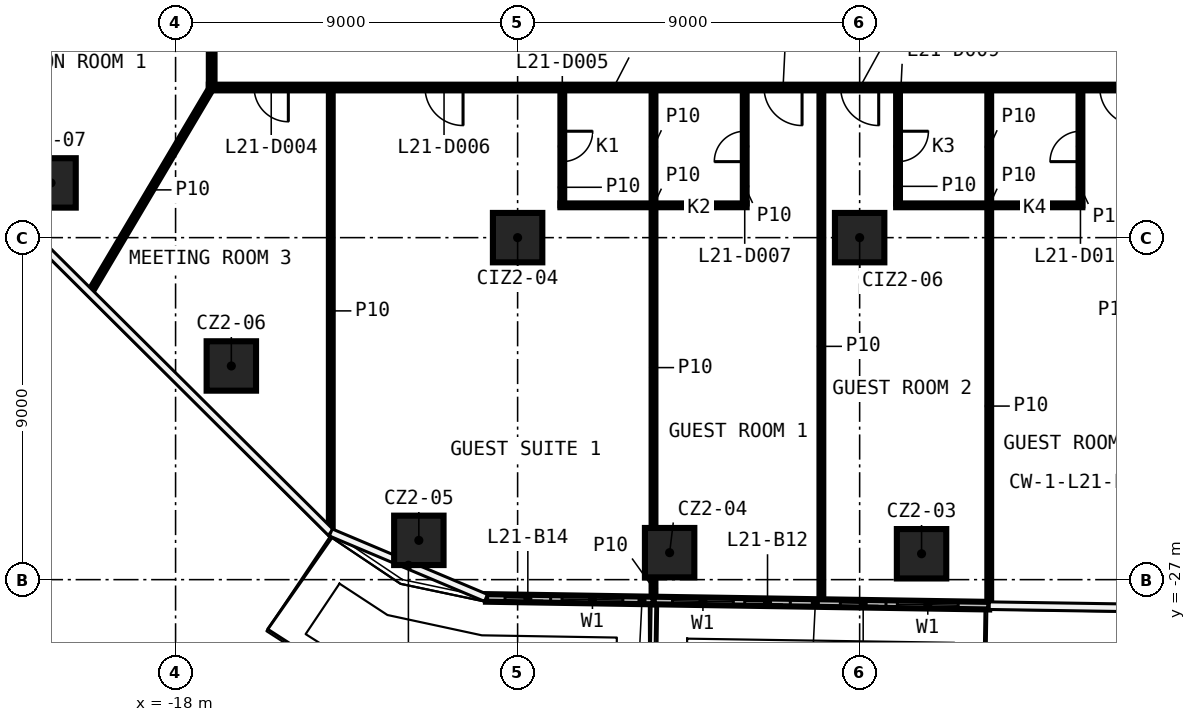
"""IFC4 building model, lengths in metres.
Left out: names, types, materials, properties, quantities, classifications, styles, units other than length and angle.
Written with IfcOpenShell. Run it as: python <this file> out.ifc"""

import sys

from ifc_helpers import new_model, si_unit, direction, frame, frame_2d, origin, origin_2d, place, context, subcontext, project, spatial, rectangle, extrude, element, fill, save


model = new_model("IFC4")
c1 = context("Model", 3, precision=1e-05, world=origin(), true_north=direction((0.0, 1.0)))
c2 = subcontext(c1, "Body", "Model", "MODEL_VIEW")
j1 = project(units=[si_unit("LENGTHUNIT", "METRE"), si_unit("PLANEANGLEUNIT", "RADIAN")], contexts=[c1])
p1 = place(None, origin())
s1 = spatial("IfcSite", under=j1, at=p1, CompositionType="ELEMENT")
p2 = place(p1, origin())
s2 = spatial("IfcBuilding", under=s1, at=p2, CompositionType="ELEMENT")
p3 = place(p2, frame((0.0, 0.0, 102.6)))
s3 = spatial("IfcBuildingStorey", under=s2, at=p3, CompositionType="ELEMENT", Elevation=102.6)
for number, where, z_axis, x_axis in (
    (1, (1.629, -26.319, 0.0), (0.0, 0.0, 1.0), (1.0, 0.0, 0.0)),
    (2, (-5.0, -26.29, 0.0), (0.0, 0.0, 1.0), (1.0, 0.0, 0.0)),
    (3, (-11.599, -25.966, 0.0), (0.0, 0.0, 1.0), (1.0, 0.0, 0.0)),
    (4, (-16.533, -21.377, 0.0), (0.0, 0.0, 1.0), (1.0, 0.0, 0.0)),
    (5, (-21.277, -16.56, 0.0), (0.0, 0.0, 1.0), (1.0, 0.0, 0.0)),
    (6, (-9.0, -18.0, 0.0), (0.0, 0.0, 1.0), (1.0, 0.0, 0.0)),
    (7, (0.0, -18.0, 0.0), (0.0, 0.0, 1.0), (1.0, 0.0, 0.0)),
):
    element("IfcColumn", number, at=place(p3, frame(where, z_axis=z_axis, x_axis=x_axis)), inside=s3, PredefinedType="COLUMN", context=c2, shape_type="SweptSolid", body=[
        extrude(rectangle(XDim=1.3, YDim=1.3, at=origin_2d()), origin(), (0.0, 0.0, 1.0), 3.3),
    ])
p4 = place(p3, frame((-7.874, -17.15, 0.0), z_axis=(0.0, 0.0, 1.0), x_axis=(1.0, 0.0, 0.0)))
e8 = element("IfcWall", 8, at=p4, inside=s3, PredefinedType="PARTITIONING", context=c2, shape_type="SweptSolid", body=[
    extrude(rectangle(XDim=4.9, YDim=0.1, at=frame_2d((2.45, 0.0))), origin(), (0.0, 0.0, 1.0), 3.3),
])
p5 = place(p3, frame((0.96, -17.15, 0.0), z_axis=(0.0, 0.0, 1.0), x_axis=(1.0, 0.0, 0.0)))
e9 = element("IfcWall", 9, at=p5, inside=s3, PredefinedType="PARTITIONING", context=c2, shape_type="SweptSolid", body=[
    extrude(rectangle(XDim=4.9, YDim=0.1, at=frame_2d((2.45, 0.0))), origin(), (0.0, 0.0, 1.0), 3.3),
])
p6 = place(p3, frame((17.125, -14.05, 0.0), z_axis=(0.0, 0.0, 1.0), x_axis=(-1.0, 0.0, 0.0)))
e10 = element("IfcWall", 10, at=p6, inside=s3, PredefinedType="PARTITIONING", context=c2, shape_type="SweptSolid", body=[
    extrude(rectangle(XDim=34.25, YDim=0.15, at=frame_2d((17.125, 0.0))), origin(), (0.0, 0.0, 1.0), 3.3),
])
p7 = place(p6, frame((32.158, 0.0, 0.0)))
e11 = element("IfcOpeningElement", 11, at=p7, cuts=e10, PredefinedType="OPENING", context=c2, shape_type="SweptSolid", body=[
    extrude(rectangle(XDim=0.9, YDim=2.1, at=frame_2d((0.45, 1.05))), frame((0.0, 0.085, 0.0), z_axis=(0.0, -1.0, 0.0), x_axis=(1.0, 0.0, 0.0)), (0.0, 0.0, 1.0), 0.17),
])
p8 = place(p6, frame((27.561, 0.0, 0.0)))
e12 = element("IfcOpeningElement", 12, at=p8, cuts=e10, PredefinedType="OPENING", context=c2, shape_type="SweptSolid", body=[
    extrude(rectangle(XDim=1.0, YDim=2.1, at=frame_2d((0.5, 1.05))), frame((0.0, 0.085, 0.0), z_axis=(0.0, -1.0, 0.0), x_axis=(1.0, 0.0, 0.0)), (0.0, 0.0, 1.0), 0.17),
])
p9 = place(p6, frame((18.64, 0.0, 0.0)))
e13 = element("IfcOpeningElement", 13, at=p9, cuts=e10, PredefinedType="OPENING", context=c2, shape_type="SweptSolid", body=[
    extrude(rectangle(XDim=1.0, YDim=2.1, at=frame_2d((0.5, 1.05))), frame((0.0, 0.085, 0.0), z_axis=(0.0, -1.0, 0.0), x_axis=(1.0, 0.0, 0.0)), (0.0, 0.0, 1.0), 0.17),
])
p10 = place(p6, frame((16.624, 0.0, 0.0)))
e14 = element("IfcOpeningElement", 14, at=p10, cuts=e10, PredefinedType="OPENING", context=c2, shape_type="SweptSolid", body=[
    extrude(rectangle(XDim=1.0, YDim=2.1, at=frame_2d((0.5, 1.05))), frame((0.0, 0.085, 0.0), z_axis=(0.0, -1.0, 0.0), x_axis=(1.0, 0.0, 0.0)), (0.0, 0.0, 1.0), 0.17),
])
p11 = place(p6, frame((9.807, 0.0, 0.0)))
e15 = element("IfcOpeningElement", 15, at=p11, cuts=e10, PredefinedType="OPENING", context=c2, shape_type="SweptSolid", body=[
    extrude(rectangle(XDim=1.0, YDim=2.1, at=frame_2d((0.5, 1.05))), frame((0.0, 0.085, 0.0), z_axis=(0.0, -1.0, 0.0), x_axis=(1.0, 0.0, 0.0)), (0.0, 0.0, 1.0), 0.17),
])
p12 = place(p6, frame((7.795, 0.0, 0.0)))
e16 = element("IfcOpeningElement", 16, at=p12, cuts=e10, PredefinedType="OPENING", context=c2, shape_type="SweptSolid", body=[
    extrude(rectangle(XDim=1.0, YDim=2.1, at=frame_2d((0.5, 1.05))), frame((0.0, 0.085, 0.0), z_axis=(0.0, -1.0, 0.0), x_axis=(1.0, 0.0, 0.0)), (0.0, 0.0, 1.0), 0.17),
])
p13 = place(p6, frame((1.119, 0.0, 0.0)))
e17 = element("IfcOpeningElement", 17, at=p13, cuts=e10, PredefinedType="OPENING", context=c2, shape_type="SweptSolid", body=[
    extrude(rectangle(XDim=1.0, YDim=2.1, at=frame_2d((0.5, 1.05))), frame((0.0, 0.085, 0.0), z_axis=(0.0, -1.0, 0.0), x_axis=(1.0, 0.0, 0.0)), (0.0, 0.0, 1.0), 0.17),
])
p14 = place(p3, frame((-20.246, -19.436, 0.0), z_axis=(0.0, 0.0, 1.0), x_axis=(0.510253226363, 0.86002421186, 0.0)))
e18 = element("IfcWall", 18, at=p14, inside=s3, PredefinedType="PARTITIONING", context=c2, shape_type="SweptSolid", body=[
    extrude(rectangle(XDim=6.263, YDim=0.1, at=frame_2d((3.132, 0.0))), origin(), (0.0, 0.0, 1.0), 3.3),
])
p15 = place(p3, frame((5.81, -17.15, 0.0), z_axis=(0.0, 0.0, 1.0), x_axis=(0.0, 1.0, 0.0)))
e19 = element("IfcWall", 19, at=p15, inside=s3, PredefinedType="PARTITIONING", context=c2, shape_type="SweptSolid", body=[
    extrude(rectangle(XDim=3.025, YDim=0.1, at=frame_2d((1.512, 0.0))), origin(), (0.0, 0.0, 1.0), 3.3),
])
p16 = place(p15, frame((1.15, 0.0, 0.0)))
e20 = element("IfcOpeningElement", 20, at=p16, cuts=e19, PredefinedType="OPENING", context=c2, shape_type="SweptSolid", body=[
    extrude(rectangle(XDim=0.8, YDim=2.1, at=frame_2d((0.4, 1.05))), frame((0.0, 0.06, 0.0), z_axis=(0.0, -1.0, 0.0), x_axis=(1.0, 0.0, 0.0)), (0.0, 0.0, 1.0), 0.12),
])
p17 = place(p3, frame((3.41, -27.665, 0.0), z_axis=(0.0, 0.0, 1.0), x_axis=(0.0, 1.0, 0.0)))
e21 = element("IfcWall", 21, at=p17, inside=s3, PredefinedType="PARTITIONING", context=c2, shape_type="SweptSolid", body=[
    extrude(rectangle(XDim=10.465, YDim=0.1, at=frame_2d((5.232, 0.0))), origin(), (0.0, 0.0, 1.0), 3.3),
])
p18 = place(p3, frame((3.41, -17.1, 0.0), z_axis=(0.0, 0.0, 1.0), x_axis=(0.0, 1.0, 0.0)))
e22 = element("IfcWall", 22, at=p18, inside=s3, PredefinedType="PARTITIONING", context=c2, shape_type="SweptSolid", body=[
    extrude(rectangle(XDim=2.975, YDim=0.1, at=frame_2d((1.488, 0.0))), origin(), (0.0, 0.0, 1.0), 3.3),
])
p19 = place(p3, frame((1.01, -14.125, 0.0), z_axis=(0.0, 0.0, 1.0), x_axis=(0.0, -1.0, 0.0)))
e23 = element("IfcWall", 23, at=p19, inside=s3, PredefinedType="PARTITIONING", context=c2, shape_type="SweptSolid", body=[
    extrude(rectangle(XDim=2.975, YDim=0.1, at=frame_2d((1.488, 0.0))), origin(), (0.0, 0.0, 1.0), 3.3),
])
p20 = place(p19, frame((1.075, 0.0, 0.0)))
e24 = element("IfcOpeningElement", 24, at=p20, cuts=e23, PredefinedType="OPENING", context=c2, shape_type="SweptSolid", body=[
    extrude(rectangle(XDim=0.8, YDim=2.1, at=frame_2d((0.4, 1.05))), frame((0.0, 0.06, 0.0), z_axis=(0.0, -1.0, 0.0), x_axis=(1.0, 0.0, 0.0)), (0.0, 0.0, 1.0), 0.12),
])
p21 = place(p3, frame((-1.007, -27.597, 0.0), z_axis=(0.0, 0.0, 1.0), x_axis=(0.0, 1.0, 0.0)))
e25 = element("IfcWall", 25, at=p21, inside=s3, PredefinedType="PARTITIONING", context=c2, shape_type="SweptSolid", body=[
    extrude(rectangle(XDim=13.472, YDim=0.1, at=frame_2d((6.736, 0.0))), origin(), (0.0, 0.0, 1.0), 3.3),
])
p22 = place(p3, frame((-3.024, -17.1, 0.0), z_axis=(0.0, 0.0, 1.0), x_axis=(0.0, 1.0, 0.0)))
e26 = element("IfcWall", 26, at=p22, inside=s3, PredefinedType="PARTITIONING", context=c2, shape_type="SweptSolid", body=[
    extrude(rectangle(XDim=2.975, YDim=0.1, at=frame_2d((1.488, 0.0))), origin(), (0.0, 0.0, 1.0), 3.3),
])
p23 = place(p22, frame((1.1, 0.0, 0.0)))
e27 = element("IfcOpeningElement", 27, at=p23, cuts=e26, PredefinedType="OPENING", context=c2, shape_type="SweptSolid", body=[
    extrude(rectangle(XDim=0.8, YDim=2.1, at=frame_2d((0.4, 1.05))), frame((0.0, 0.06, 0.0), z_axis=(0.0, -1.0, 0.0), x_axis=(1.0, 0.0, 0.0)), (0.0, 0.0, 1.0), 0.12),
])
p24 = place(p3, frame((-5.424, -27.529, 0.0), z_axis=(0.0, 0.0, 1.0), x_axis=(0.0, 1.0, 0.0)))
e28 = element("IfcWall", 28, at=p24, inside=s3, PredefinedType="PARTITIONING", context=c2, shape_type="SweptSolid", body=[
    extrude(rectangle(XDim=0.589, YDim=0.1, at=frame_2d((0.294, 0.0))), origin(), (0.0, 0.0, 1.0), 3.3),
])
p25 = place(p3, frame((-5.424, -25.64, 0.0), z_axis=(0.0, 0.0, 1.0), x_axis=(0.0, 1.0, 0.0)))
e29 = element("IfcWall", 29, at=p25, inside=s3, PredefinedType="PARTITIONING", context=c2, shape_type="SweptSolid", body=[
    extrude(rectangle(XDim=8.44, YDim=0.1, at=frame_2d((4.22, 0.0))), origin(), (0.0, 0.0, 1.0), 3.3),
])
p26 = place(p3, frame((-5.424, -17.1, 0.0), z_axis=(0.0, 0.0, 1.0), x_axis=(0.0, 1.0, 0.0)))
e30 = element("IfcWall", 30, at=p26, inside=s3, PredefinedType="PARTITIONING", context=c2, shape_type="SweptSolid", body=[
    extrude(rectangle(XDim=2.975, YDim=0.1, at=frame_2d((1.488, 0.0))), origin(), (0.0, 0.0, 1.0), 3.3),
])
p27 = place(p3, frame((-7.824, -14.125, 0.0), z_axis=(0.0, 0.0, 1.0), x_axis=(0.0, -1.0, 0.0)))
e31 = element("IfcWall", 31, at=p27, inside=s3, PredefinedType="PARTITIONING", context=c2, shape_type="SweptSolid", body=[
    extrude(rectangle(XDim=3.025, YDim=0.1, at=frame_2d((1.512, 0.0))), origin(), (0.0, 0.0, 1.0), 3.3),
])
p28 = place(p27, frame((1.075, 0.0, 0.0)))
e32 = element("IfcOpeningElement", 32, at=p28, cuts=e31, PredefinedType="OPENING", context=c2, shape_type="SweptSolid", body=[
    extrude(rectangle(XDim=0.8, YDim=2.1, at=frame_2d((0.4, 1.05))), frame((0.0, 0.06, 0.0), z_axis=(0.0, -1.0, 0.0), x_axis=(1.0, 0.0, 0.0)), (0.0, 0.0, 1.0), 0.12),
])
p29 = place(p3, frame((-13.916, -25.73, 0.0), z_axis=(0.0, 0.0, 1.0), x_axis=(0.0, 1.0, 0.0)))
e33 = element("IfcWall", 33, at=p29, inside=s3, PredefinedType="PARTITIONING", context=c2, shape_type="SweptSolid", body=[
    extrude(rectangle(XDim=11.605, YDim=0.1, at=frame_2d((5.802, 0.0))), origin(), (0.0, 0.0, 1.0), 3.3),
])
p30 = place(p3, frame((-17.05, -13.975, 0.0), z_axis=(0.0, 0.0, 1.0), x_axis=(0.0, 1.0, 0.0)))
e34 = element("IfcWall", 34, at=p30, inside=s3, PredefinedType="PARTITIONING", context=c2, shape_type="SweptSolid", body=[
    extrude(rectangle(XDim=27.95, YDim=0.15, at=frame_2d((13.975, 0.0))), origin(), (0.0, 0.0, 1.0), 3.3),
])
p31 = place(p30, frame((11.195, 0.0, 0.0)))
e35 = element("IfcOpeningElement", 35, at=p31, cuts=e34, PredefinedType="OPENING", context=c2, shape_type="SweptSolid", body=[
    extrude(rectangle(XDim=0.9, YDim=2.1, at=frame_2d((0.45, 1.05))), frame((0.0, 0.085, 0.0), z_axis=(0.0, -1.0, 0.0), x_axis=(1.0, 0.0, 0.0)), (0.0, 0.0, 1.0), 0.17),
])
p32 = place(p30, frame((8.57, 0.0, 0.0)))
e36 = element("IfcOpeningElement", 36, at=p32, cuts=e34, PredefinedType="OPENING", context=c2, shape_type="SweptSolid", body=[
    extrude(rectangle(XDim=0.9, YDim=2.1, at=frame_2d((0.45, 1.05))), frame((0.0, 0.085, 0.0), z_axis=(0.0, -1.0, 0.0), x_axis=(1.0, 0.0, 0.0)), (0.0, 0.0, 1.0), 0.17),
])
p33 = place(p30, frame((1.956, 0.0, 0.0)))
e37 = element("IfcOpeningElement", 37, at=p33, cuts=e34, PredefinedType="OPENING", context=c2, shape_type="SweptSolid", body=[
    extrude(rectangle(XDim=0.9, YDim=2.1, at=frame_2d((0.45, 1.05))), frame((0.0, 0.085, 0.0), z_axis=(0.0, -1.0, 0.0), x_axis=(1.0, 0.0, 0.0)), (0.0, 0.0, 1.0), 0.17),
])
p34 = place(p30, frame((25.181, 0.0, 0.0)))
e38 = element("IfcOpeningElement", 38, at=p34, cuts=e34, PredefinedType="OPENING", context=c2, shape_type="SweptSolid", body=[
    extrude(rectangle(XDim=0.9, YDim=2.1, at=frame_2d((0.45, 1.05))), frame((0.0, 0.085, 0.0), z_axis=(0.0, -1.0, 0.0), x_axis=(1.0, 0.0, 0.0)), (0.0, 0.0, 1.0), 0.17),
])
p35 = place(p30, frame((20.101, 0.0, 0.0)))
e39 = element("IfcOpeningElement", 39, at=p35, cuts=e34, PredefinedType="OPENING", context=c2, shape_type="SweptSolid", body=[
    extrude(rectangle(XDim=0.9, YDim=2.1, at=frame_2d((0.45, 1.05))), frame((0.0, 0.085, 0.0), z_axis=(0.0, -1.0, 0.0), x_axis=(1.0, 0.0, 0.0)), (0.0, 0.0, 1.0), 0.17),
])
p36 = place(p30, frame((16.206, 0.0, 0.0)))
e40 = element("IfcOpeningElement", 40, at=p36, cuts=e34, PredefinedType="OPENING", context=c2, shape_type="SweptSolid", body=[
    extrude(rectangle(XDim=0.9, YDim=2.1, at=frame_2d((0.45, 1.05))), frame((0.0, 0.085, 0.0), z_axis=(0.0, -1.0, 0.0), x_axis=(1.0, 0.0, 0.0)), (0.0, 0.0, 1.0), 0.17),
])
p37 = place(p3, frame((-5.424, -27.549, 0.0), z_axis=(0.0, 0.0, 1.0), x_axis=(0.999881101657, -0.015420199401, 0.0)))
e41 = element("IfcWall", 41, at=p37, inside=s3, PredefinedType="SOLIDWALL", context=c2, shape_type="SweptSolid", body=[
    extrude(rectangle(XDim=8.834, YDim=0.2, at=frame_2d((4.417, 0.0))), origin(), (0.0, 0.0, 1.0), 3.25),
])
p38 = place(p37, frame((0.5, 0.0, 0.6)))
e42 = element("IfcOpeningElement", 42, at=p38, cuts=e41, PredefinedType="OPENING", context=c2, shape_type="SweptSolid", body=[
    extrude(rectangle(XDim=1.6, YDim=2.4, at=frame_2d((0.8, 1.2))), frame((0.0, 0.11, 0.0), z_axis=(0.0, -1.0, 0.0), x_axis=(1.0, 0.0, 0.0)), (0.0, 0.0, 1.0), 0.22),
])
p39 = place(p37, frame((2.4, 0.0, 0.0)))
e43 = element("IfcOpeningElement", 43, at=p39, cuts=e41, PredefinedType="OPENING", context=c2, shape_type="SweptSolid", body=[
    extrude(rectangle(XDim=1.2, YDim=2.4, at=frame_2d((0.6, 1.2))), frame((0.0, 0.11, 0.0), z_axis=(0.0, -1.0, 0.0), x_axis=(1.0, 0.0, 0.0)), (0.0, 0.0, 1.0), 0.22),
])
p40 = place(p37, frame((6.417, 0.0, 0.6)))
e44 = element("IfcOpeningElement", 44, at=p40, cuts=e41, PredefinedType="OPENING", context=c2, shape_type="SweptSolid", body=[
    extrude(rectangle(XDim=1.6, YDim=2.4, at=frame_2d((0.8, 1.2))), frame((0.0, 0.11, 0.0), z_axis=(0.0, -1.0, 0.0), x_axis=(1.0, 0.0, 0.0)), (0.0, 0.0, 1.0), 0.22),
])
p41 = place(p37, frame((4.917, 0.0, 0.0)))
e45 = element("IfcOpeningElement", 45, at=p41, cuts=e41, PredefinedType="OPENING", context=c2, shape_type="SweptSolid", body=[
    extrude(rectangle(XDim=1.2, YDim=2.4, at=frame_2d((0.6, 1.2))), frame((0.0, 0.11, 0.0), z_axis=(0.0, -1.0, 0.0), x_axis=(1.0, 0.0, 0.0)), (0.0, 0.0, 1.0), 0.22),
])
p42 = place(p3, frame((-9.831, -27.481, 0.0), z_axis=(0.0, 0.0, 1.0), x_axis=(0.99988144177, -0.015398129892, 0.0)))
e46 = element("IfcWall", 46, at=p42, inside=s3, PredefinedType="SOLIDWALL", context=c2, shape_type="SweptSolid", body=[
    extrude(rectangle(XDim=4.408, YDim=0.2, at=frame_2d((2.204, 0.0))), origin(), (0.0, 0.0, 1.0), 3.25),
])
p43 = place(p42, frame((2.0, 0.0, 0.6)))
e47 = element("IfcOpeningElement", 47, at=p43, cuts=e46, PredefinedType="OPENING", context=c2, shape_type="SweptSolid", body=[
    extrude(rectangle(XDim=1.6, YDim=2.4, at=frame_2d((0.8, 1.2))), frame((0.0, 0.11, 0.0), z_axis=(0.0, -1.0, 0.0), x_axis=(1.0, 0.0, 0.0)), (0.0, 0.0, 1.0), 0.22),
])
p44 = place(p42, frame((0.5, 0.0, 0.0)))
e48 = element("IfcOpeningElement", 48, at=p44, cuts=e46, PredefinedType="OPENING", context=c2, shape_type="SweptSolid", body=[
    extrude(rectangle(XDim=1.2, YDim=2.4, at=frame_2d((0.6, 1.2))), frame((0.0, 0.11, 0.0), z_axis=(0.0, -1.0, 0.0), x_axis=(1.0, 0.0, 0.0)), (0.0, 0.0, 1.0), 0.22),
])
p45 = place(p7, origin())
e49 = element("IfcDoor", 49, at=p45, inside=s3, OperationType="SINGLE_SWING_RIGHT", PredefinedType="DOOR", context=c2, shape_type="SweptSolid", body=[
    extrude(rectangle(XDim=0.9, YDim=2.1, at=frame_2d((0.45, 1.05))), frame((0.0, 0.025, 0.0), z_axis=(0.0, -1.0, 0.0), x_axis=(1.0, 0.0, 0.0)), (0.0, 0.0, 1.0), 0.05),
])
fill(e11, e49)
p46 = place(p28, origin())
e50 = element("IfcDoor", 50, at=p46, inside=s3, OperationType="SINGLE_SWING_RIGHT", PredefinedType="DOOR", context=c2, shape_type="SweptSolid", body=[
    extrude(rectangle(XDim=0.8, YDim=2.1, at=frame_2d((0.4, 1.05))), frame((0.0, 0.025, 0.0), z_axis=(0.0, -1.0, 0.0), x_axis=(1.0, 0.0, 0.0)), (0.0, 0.0, 1.0), 0.05),
])
fill(e32, e50)
p47 = place(p8, origin())
e51 = element("IfcDoor", 51, at=p47, inside=s3, OperationType="SINGLE_SWING_LEFT", PredefinedType="DOOR", context=c2, shape_type="SweptSolid", body=[
    extrude(rectangle(XDim=1.0, YDim=2.1, at=frame_2d((0.5, 1.05))), frame((0.0, 0.025, 0.0), z_axis=(0.0, -1.0, 0.0), x_axis=(1.0, 0.0, 0.0)), (0.0, 0.0, 1.0), 0.05),
])
fill(e12, e51)
p48 = place(p23, origin())
e52 = element("IfcDoor", 52, at=p48, inside=s3, OperationType="SINGLE_SWING_LEFT", PredefinedType="DOOR", context=c2, shape_type="SweptSolid", body=[
    extrude(rectangle(XDim=0.8, YDim=2.1, at=frame_2d((0.4, 1.05))), frame((0.0, 0.025, 0.0), z_axis=(0.0, -1.0, 0.0), x_axis=(1.0, 0.0, 0.0)), (0.0, 0.0, 1.0), 0.05),
])
fill(e27, e52)
p49 = place(p9, origin())
e53 = element("IfcDoor", 53, at=p49, inside=s3, OperationType="SINGLE_SWING_RIGHT", PredefinedType="DOOR", context=c2, shape_type="SweptSolid", body=[
    extrude(rectangle(XDim=1.0, YDim=2.1, at=frame_2d((0.5, 1.05))), frame((0.0, 0.025, 0.0), z_axis=(0.0, -1.0, 0.0), x_axis=(1.0, 0.0, 0.0)), (0.0, 0.0, 1.0), 0.05),
])
fill(e13, e53)
p50 = place(p20, origin())
e54 = element("IfcDoor", 54, at=p50, inside=s3, OperationType="SINGLE_SWING_RIGHT", PredefinedType="DOOR", context=c2, shape_type="SweptSolid", body=[
    extrude(rectangle(XDim=0.8, YDim=2.1, at=frame_2d((0.4, 1.05))), frame((0.0, 0.025, 0.0), z_axis=(0.0, -1.0, 0.0), x_axis=(1.0, 0.0, 0.0)), (0.0, 0.0, 1.0), 0.05),
])
fill(e24, e54)
p51 = place(p10, origin())
e55 = element("IfcDoor", 55, at=p51, inside=s3, OperationType="SINGLE_SWING_LEFT", PredefinedType="DOOR", context=c2, shape_type="SweptSolid", body=[
    extrude(rectangle(XDim=1.0, YDim=2.1, at=frame_2d((0.5, 1.05))), frame((0.0, 0.025, 0.0), z_axis=(0.0, -1.0, 0.0), x_axis=(1.0, 0.0, 0.0)), (0.0, 0.0, 1.0), 0.05),
])
fill(e14, e55)
p52 = place(p16, origin())
e56 = element("IfcDoor", 56, at=p52, inside=s3, OperationType="SINGLE_SWING_LEFT", PredefinedType="DOOR", context=c2, shape_type="SweptSolid", body=[
    extrude(rectangle(XDim=0.8, YDim=2.1, at=frame_2d((0.4, 1.05))), frame((0.0, 0.025, 0.0), z_axis=(0.0, -1.0, 0.0), x_axis=(1.0, 0.0, 0.0)), (0.0, 0.0, 1.0), 0.05),
])
fill(e20, e56)
p53 = place(p11, origin())
e57 = element("IfcDoor", 57, at=p53, inside=s3, OperationType="SINGLE_SWING_RIGHT", PredefinedType="DOOR", context=c2, shape_type="SweptSolid", body=[
    extrude(rectangle(XDim=1.0, YDim=2.1, at=frame_2d((0.5, 1.05))), frame((0.0, 0.025, 0.0), z_axis=(0.0, -1.0, 0.0), x_axis=(1.0, 0.0, 0.0)), (0.0, 0.0, 1.0), 0.05),
])
fill(e15, e57)
p54 = place(p38, origin())
e58 = element("IfcWindow", 58, at=p54, inside=s3, PartitioningType="SINGLE_PANEL", PredefinedType="WINDOW", context=c2, shape_type="SweptSolid", body=[
    extrude(rectangle(XDim=1.6, YDim=2.4, at=frame_2d((0.8, 1.2))), frame((0.0, 0.03, 0.0), z_axis=(0.0, -1.0, 0.0), x_axis=(1.0, 0.0, 0.0)), (0.0, 0.0, 1.0), 0.06),
])
fill(e42, e58)
p55 = place(p39, origin())
e59 = element("IfcDoor", 59, at=p55, inside=s3, OperationType="SLIDING_TO_LEFT", PredefinedType="DOOR", context=c2, shape_type="SweptSolid", body=[
    extrude(rectangle(XDim=1.2, YDim=2.4, at=frame_2d((0.6, 1.2))), frame((0.0, 0.025, 0.0), z_axis=(0.0, -1.0, 0.0), x_axis=(1.0, 0.0, 0.0)), (0.0, 0.0, 1.0), 0.05),
])
fill(e43, e59)
p56 = place(p40, origin())
e60 = element("IfcWindow", 60, at=p56, inside=s3, PartitioningType="SINGLE_PANEL", PredefinedType="WINDOW", context=c2, shape_type="SweptSolid", body=[
    extrude(rectangle(XDim=1.6, YDim=2.4, at=frame_2d((0.8, 1.2))), frame((0.0, 0.03, 0.0), z_axis=(0.0, -1.0, 0.0), x_axis=(1.0, 0.0, 0.0)), (0.0, 0.0, 1.0), 0.06),
])
fill(e44, e60)
p57 = place(p41, origin())
e61 = element("IfcDoor", 61, at=p57, inside=s3, OperationType="SLIDING_TO_LEFT", PredefinedType="DOOR", context=c2, shape_type="SweptSolid", body=[
    extrude(rectangle(XDim=1.2, YDim=2.4, at=frame_2d((0.6, 1.2))), frame((0.0, 0.025, 0.0), z_axis=(0.0, -1.0, 0.0), x_axis=(1.0, 0.0, 0.0)), (0.0, 0.0, 1.0), 0.05),
])
fill(e45, e61)
p58 = place(p43, origin())
e62 = element("IfcWindow", 62, at=p58, inside=s3, PartitioningType="SINGLE_PANEL", PredefinedType="WINDOW", context=c2, shape_type="SweptSolid", body=[
    extrude(rectangle(XDim=1.6, YDim=2.4, at=frame_2d((0.8, 1.2))), frame((0.0, 0.03, 0.0), z_axis=(0.0, -1.0, 0.0), x_axis=(1.0, 0.0, 0.0)), (0.0, 0.0, 1.0), 0.06),
])
fill(e47, e62)
p59 = place(p44, origin())
e63 = element("IfcDoor", 63, at=p59, inside=s3, OperationType="SLIDING_TO_LEFT", PredefinedType="DOOR", context=c2, shape_type="SweptSolid", body=[
    extrude(rectangle(XDim=1.2, YDim=2.4, at=frame_2d((0.6, 1.2))), frame((0.0, 0.025, 0.0), z_axis=(0.0, -1.0, 0.0), x_axis=(1.0, 0.0, 0.0)), (0.0, 0.0, 1.0), 0.05),
])
fill(e48, e63)
save(model, sys.argv[1])
